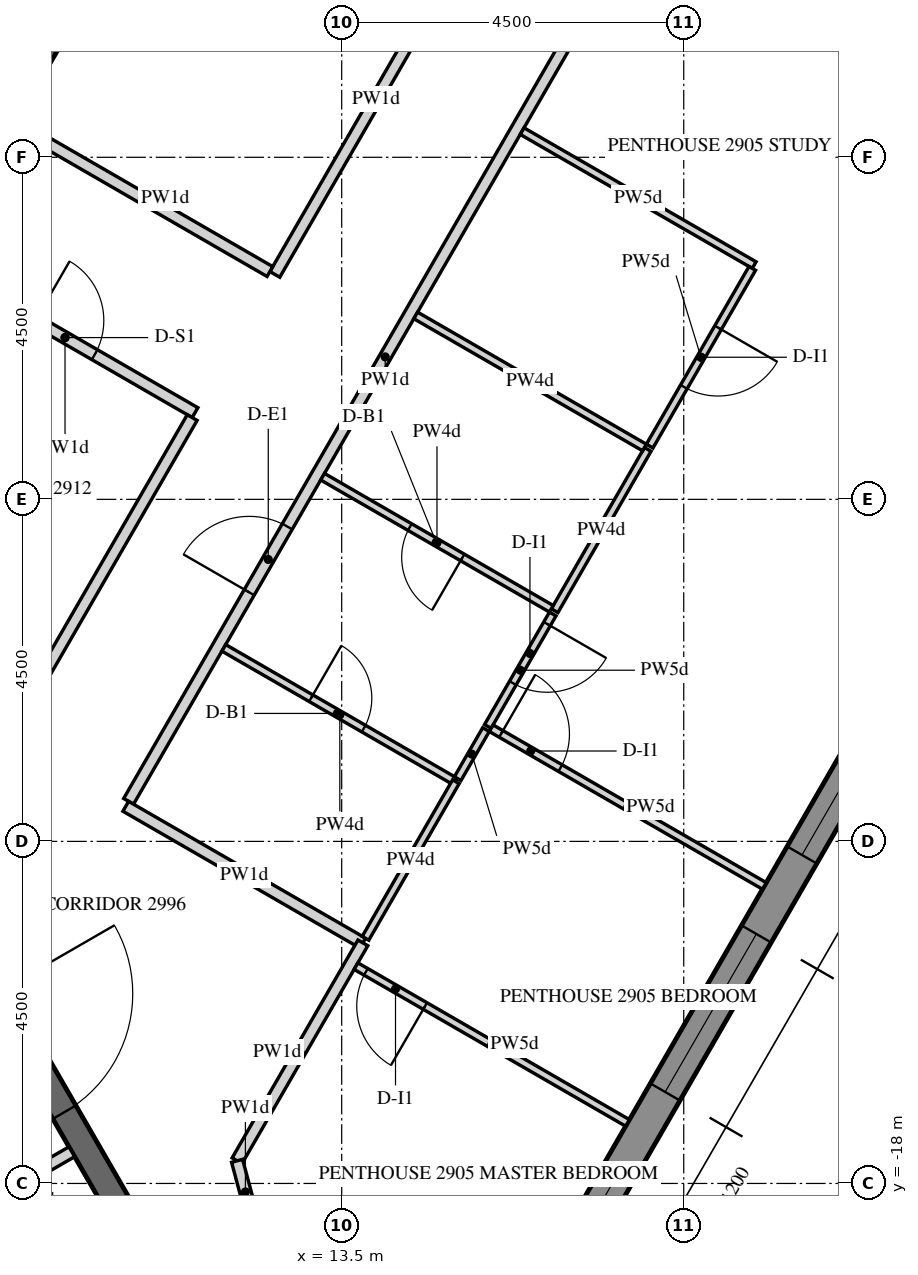
"""IFC4 building model, lengths in metres.
Left out: names, types, materials, properties, quantities, classifications, styles, units other than length and angle.
Written with IfcOpenShell. Run it as: python <this file> out.ifc"""

import sys

from ifc_helpers import new_model, si_unit, direction, frame, frame_2d, origin, place, context, subcontext, project, spatial, polyline, rectangle, outline, extrude, element, fill, save


model = new_model("IFC4")
c1 = context("Model", 3, precision=1e-05, world=origin(), true_north=direction((0.0, 1.0)))
c2 = subcontext(c1, "Body", "Model", "MODEL_VIEW")
j1 = project(units=[si_unit("LENGTHUNIT", "METRE"), si_unit("PLANEANGLEUNIT", "RADIAN")], contexts=[c1])
p1 = place(None, origin())
s1 = spatial("IfcSite", under=j1, at=p1, CompositionType="ELEMENT")
p2 = place(p1, origin())
s2 = spatial("IfcBuilding", under=s1, at=p2, CompositionType="ELEMENT")
p3 = place(p2, frame((0.0, 0.0, 372.9)))
s3 = spatial("IfcBuildingStorey", under=s2, at=p3, CompositionType="ELEMENT", Elevation=372.9)
p4 = place(p3, frame((15.273, -21.097, -0.15), z_axis=(0.0, 0.0, 1.0), x_axis=(0.499997453958, 0.866026873738, 0.0)))
e1 = element("IfcWall", 1, at=p4, inside=s3, PredefinedType="SOLIDWALL", context=c2, shape_type="SweptSolid", body=[
    extrude(outline(polyline([(-0.018, -0.225), (23.152, -0.225), (23.11, 0.225), (0.018, 0.225), (-0.018, -0.225)])), origin(), (0.0, 0.0, 1.0), 3.55),
])
p5 = place(p4, frame((1.366, 0.0, 0.45)))
e2 = element("IfcOpeningElement", 2, at=p5, cuts=e1, PredefinedType="OPENING", context=c2, shape_type="SweptSolid", body=[
    extrude(rectangle(XDim=2.4, YDim=3.0, at=frame_2d((1.2, 1.5))), frame((0.0, 0.235, 0.0), z_axis=(0.0, -1.0, 0.0), x_axis=(1.0, 0.0, 0.0)), (0.0, 0.0, 1.0), 0.47),
])
p6 = place(p4, frame((4.966, 0.0, 0.45)))
e3 = element("IfcOpeningElement", 3, at=p6, cuts=e1, PredefinedType="OPENING", context=c2, shape_type="SweptSolid", body=[
    extrude(rectangle(XDim=2.4, YDim=3.0, at=frame_2d((1.2, 1.5))), frame((0.0, 0.235, 0.0), z_axis=(0.0, -1.0, 0.0), x_axis=(1.0, 0.0, 0.0)), (0.0, 0.0, 1.0), 0.47),
])
p7 = place(p4, frame((8.566, 0.0, 0.45)))
e4 = element("IfcOpeningElement", 4, at=p7, cuts=e1, PredefinedType="OPENING", context=c2, shape_type="SweptSolid", body=[
    extrude(rectangle(XDim=2.4, YDim=3.0, at=frame_2d((1.2, 1.5))), frame((0.0, 0.235, 0.0), z_axis=(0.0, -1.0, 0.0), x_axis=(1.0, 0.0, 0.0)), (0.0, 0.0, 1.0), 0.47),
])
p8 = place(p4, frame((12.166, 0.0, 0.45)))
e5 = element("IfcOpeningElement", 5, at=p8, cuts=e1, PredefinedType="OPENING", context=c2, shape_type="SweptSolid", body=[
    extrude(rectangle(XDim=2.4, YDim=3.0, at=frame_2d((1.2, 1.5))), frame((0.0, 0.235, 0.0), z_axis=(0.0, -1.0, 0.0), x_axis=(1.0, 0.0, 0.0)), (0.0, 0.0, 1.0), 0.47),
])
p9 = place(p4, frame((15.766, 0.0, 0.45)))
e6 = element("IfcOpeningElement", 6, at=p9, cuts=e1, PredefinedType="OPENING", context=c2, shape_type="SweptSolid", body=[
    extrude(rectangle(XDim=2.4, YDim=3.0, at=frame_2d((1.2, 1.5))), frame((0.0, 0.235, 0.0), z_axis=(0.0, -1.0, 0.0), x_axis=(1.0, 0.0, 0.0)), (0.0, 0.0, 1.0), 0.47),
])
p10 = place(p4, frame((19.366, 0.0, 0.45)))
e7 = element("IfcOpeningElement", 7, at=p10, cuts=e1, PredefinedType="OPENING", context=c2, shape_type="SweptSolid", body=[
    extrude(rectangle(XDim=2.4, YDim=3.0, at=frame_2d((1.2, 1.5))), frame((0.0, 0.235, 0.0), z_axis=(0.0, -1.0, 0.0), x_axis=(1.0, 0.0, 0.0)), (0.0, 0.0, 1.0), 0.47),
])
p11 = place(p3, frame((5.673, -9.825, -0.15), z_axis=(0.0, 0.0, 1.0), x_axis=(0.499995046907, 0.866028263435, 0.0)))
e8 = element("IfcWall", 8, at=p11, inside=s3, PredefinedType="SHEAR", context=c2, shape_type="SweptSolid", body=[
    extrude(outline(polyline([(-0.101, -0.175), (11.446, -0.175), (11.244, 0.175), (0.101, 0.175), (-0.101, -0.175)])), origin(), (0.0, 0.0, 1.0), 3.55),
])
p12 = place(p11, frame((4.801, 0.0, 0.15)))
e9 = element("IfcOpeningElement", 9, at=p12, cuts=e8, PredefinedType="OPENING", context=c2, shape_type="SweptSolid", body=[
    extrude(rectangle(XDim=1.8, YDim=2.4, at=frame_2d((0.9, 1.2))), frame((0.0, 0.185, 0.0), z_axis=(0.0, -1.0, 0.0), x_axis=(1.0, 0.0, 0.0)), (0.0, 0.0, 1.0), 0.37),
])
p13 = place(p3, frame((5.773, -10.0, -0.15), z_axis=(0.0, 0.0, 1.0), x_axis=(0.500007911273, -0.866020836161, 0.0)))
e10 = element("IfcWall", 10, at=p13, inside=s3, PredefinedType="SHEAR", context=c2, shape_type="SweptSolid", body=[
    extrude(rectangle(XDim=14.51, YDim=0.35, at=frame_2d((7.255, 0.0))), origin(), (0.0, 0.0, 1.0), 3.55),
])
p14 = place(p13, frame((6.355, 0.0, 0.15)))
e11 = element("IfcOpeningElement", 11, at=p14, cuts=e10, PredefinedType="OPENING", context=c2, shape_type="SweptSolid", body=[
    extrude(rectangle(XDim=1.8, YDim=2.4, at=frame_2d((0.9, 1.2))), frame((0.0, 0.185, 0.0), z_axis=(0.0, -1.0, 0.0), x_axis=(1.0, 0.0, 0.0)), (0.0, 0.0, 1.0), 0.37),
])
p15 = place(p3, frame((8.456, -18.446, 0.0), z_axis=(0.0, 0.0, 1.0), x_axis=(0.866013532718, 0.500020560727, 0.0)))
e12 = element("IfcWall", 12, at=p15, inside=s3, PredefinedType="PARTITIONING", context=c2, shape_type="SweptSolid", body=[
    extrude(rectangle(XDim=1.725, YDim=0.15, at=frame_2d((0.863, 0.0))), origin(), (0.0, 0.0, 1.0), 2.47),
])
p16 = place(p3, frame((10.697, -12.973, 0.0), z_axis=(0.0, 0.0, 1.0), x_axis=(0.499991115059, 0.866030533446, 0.0)))
e13 = element("IfcWall", 13, at=p16, inside=s3, PredefinedType="PARTITIONING", context=c2, shape_type="SweptSolid", body=[
    extrude(rectangle(XDim=13.504, YDim=0.15, at=frame_2d((6.752, 0.0))), origin(), (0.0, 0.0, 1.0), 2.47),
])
p17 = place(p16, frame((3.175, 0.0, 0.0)))
e14 = element("IfcOpeningElement", 14, at=p17, cuts=e13, PredefinedType="OPENING", context=c2, shape_type="SweptSolid", body=[
    extrude(rectangle(XDim=1.0, YDim=2.1, at=frame_2d((0.5, 1.05))), frame((0.0, 0.085, 0.0), z_axis=(0.0, -1.0, 0.0), x_axis=(1.0, 0.0, 0.0)), (0.0, 0.0, 1.0), 0.17),
])
p18 = place(p3, frame((13.777, -14.838, 0.0), z_axis=(0.0, 0.0, 1.0), x_axis=(-0.866047807691, 0.499961193289, 0.0)))
e15 = element("IfcWall", 15, at=p18, inside=s3, PredefinedType="PARTITIONING", context=c2, shape_type="SweptSolid", body=[
    extrude(rectangle(XDim=3.6, YDim=0.15, at=frame_2d((1.8, 0.0))), origin(), (0.0, 0.0, 1.0), 2.47),
])
p19 = place(p3, frame((12.124, -17.701, 0.0), z_axis=(0.0, 0.0, 1.0), x_axis=(0.500018282537, 0.866014848099, 0.0)))
e16 = element("IfcWall", 16, at=p19, inside=s3, PredefinedType="PARTITIONING", context=c2, shape_type="SweptSolid", body=[
    extrude(rectangle(XDim=3.31, YDim=0.15, at=frame_2d((1.655, 0.0))), origin(), (0.0, 0.0, 1.0), 2.47),
])
p20 = place(p3, frame((12.343, -18.521, 0.0), z_axis=(0.0, 0.0, 1.0), x_axis=(-0.258846545656, 0.965918457118, 0.0)))
e17 = element("IfcWall", 17, at=p20, inside=s3, PredefinedType="PARTITIONING", context=c2, shape_type="SweptSolid", body=[
    extrude(rectangle(XDim=0.847, YDim=0.15, at=frame_2d((0.423, 0.0))), origin(), (0.0, 0.0, 1.0), 2.47),
])
p21 = place(p3, frame((15.285, -1.425, 0.0), z_axis=(0.0, 0.0, 1.0), x_axis=(-0.499972278664, -0.866041408113, 0.0)))
e18 = element("IfcWall", 18, at=p21, inside=s3, PredefinedType="PARTITIONING", context=c2, shape_type="SweptSolid", body=[
    extrude(rectangle(XDim=5.329, YDim=0.15, at=frame_2d((2.665, 0.0))), origin(), (0.0, 0.0, 1.0), 2.47),
])
p22 = place(p3, frame((12.555, -6.003, 0.0), z_axis=(0.0, 0.0, 1.0), x_axis=(-0.866016658288, 0.500015147339, 0.0)))
e19 = element("IfcWall", 19, at=p22, inside=s3, PredefinedType="PARTITIONING", context=c2, shape_type="SweptSolid", body=[
    extrude(rectangle(XDim=3.875, YDim=0.15, at=frame_2d((1.938, 0.0))), origin(), (0.0, 0.0, 1.0), 2.47),
])
p23 = place(p3, frame((8.15, -5.884, 0.0), z_axis=(0.0, 0.0, 1.0), x_axis=(0.866020906874, -0.500007788796, 0.0)))
e20 = element("IfcWall", 20, at=p23, inside=s3, PredefinedType="PARTITIONING", context=c2, shape_type="SweptSolid", body=[
    extrude(rectangle(XDim=3.95, YDim=0.15, at=frame_2d((1.975, 0.0))), origin(), (0.0, 0.0, 1.0), 2.47),
])
p24 = place(p23, frame((1.525, 0.0, 0.0)))
e21 = element("IfcOpeningElement", 21, at=p24, cuts=e20, PredefinedType="OPENING", context=c2, shape_type="SweptSolid", body=[
    extrude(rectangle(XDim=0.9, YDim=2.1, at=frame_2d((0.45, 1.05))), frame((0.0, 0.085, 0.0), z_axis=(0.0, -1.0, 0.0), x_axis=(1.0, 0.0, 0.0)), (0.0, 0.0, 1.0), 0.17),
])
p25 = place(p3, frame((11.533, -7.924, 0.0), z_axis=(0.0, 0.0, 1.0), x_axis=(-0.500001804394, -0.866024362014, 0.0)))
e22 = element("IfcWall", 22, at=p25, inside=s3, PredefinedType="PARTITIONING", context=c2, shape_type="SweptSolid", body=[
    extrude(rectangle(XDim=3.909, YDim=0.15, at=frame_2d((1.954, 0.0))), origin(), (0.0, 0.0, 1.0), 2.47),
])
p26 = place(p3, frame((16.277, -10.508, 0.0), z_axis=(0.0, 0.0, 1.0), x_axis=(-0.500027584368, -0.866009477356, 0.0)))
e23 = element("IfcWall", 23, at=p26, inside=s3, PredefinedType="PARTITIONING", context=c2, shape_type="SweptSolid", body=[
    extrude(rectangle(XDim=1.708, YDim=0.1, at=frame_2d((0.854, 0.0))), origin(), (0.0, 0.0, 1.0), 2.47),
])
p27 = place(p26, frame((0.15, 0.0, 0.0)))
e24 = element("IfcOpeningElement", 24, at=p27, cuts=e23, PredefinedType="OPENING", context=c2, shape_type="SweptSolid", body=[
    extrude(rectangle(XDim=0.9, YDim=2.1, at=frame_2d((0.45, 1.05))), frame((0.0, 0.06, 0.0), z_axis=(0.0, -1.0, 0.0), x_axis=(1.0, 0.0, 0.0)), (0.0, 0.0, 1.0), 0.12),
])
p28 = place(p3, frame((15.467, -12.011, 0.0), z_axis=(0.0, 0.0, 1.0), x_axis=(0.86602981871, -0.499992353047, 0.0)))
e25 = element("IfcWall", 25, at=p28, inside=s3, PredefinedType="PARTITIONING", context=c2, shape_type="SweptSolid", body=[
    extrude(rectangle(XDim=4.15, YDim=0.1, at=frame_2d((2.075, 0.0))), origin(), (0.0, 0.0, 1.0), 2.47),
])
p29 = place(p28, frame((0.15, 0.0, 0.0)))
e26 = element("IfcOpeningElement", 26, at=p29, cuts=e25, PredefinedType="OPENING", context=c2, shape_type="SweptSolid", body=[
    extrude(rectangle(XDim=0.9, YDim=2.1, at=frame_2d((0.45, 1.05))), frame((0.0, 0.06, 0.0), z_axis=(0.0, -1.0, 0.0), x_axis=(1.0, 0.0, 0.0)), (0.0, 0.0, 1.0), 0.12),
])
p30 = place(p3, frame((17.527, -8.343, 0.0), z_axis=(0.0, 0.0, 1.0), x_axis=(-0.500018594424, -0.866014668023, 0.0)))
e27 = element("IfcWall", 27, at=p30, inside=s3, PredefinedType="PARTITIONING", context=c2, shape_type="SweptSolid", body=[
    extrude(rectangle(XDim=2.45, YDim=0.1, at=frame_2d((1.225, 0.0))), origin(), (0.0, 0.0, 1.0), 2.47),
])
p31 = place(p3, frame((15.874, -4.156, 0.0), z_axis=(0.0, 0.0, 1.0), x_axis=(0.866031034943, -0.499990246421, 0.0)))
e28 = element("IfcWall", 28, at=p31, inside=s3, PredefinedType="PARTITIONING", context=c2, shape_type="SweptSolid", body=[
    extrude(rectangle(XDim=3.525, YDim=0.1, at=frame_2d((1.762, 0.0))), origin(), (0.0, 0.0, 1.0), 2.47),
])
p32 = place(p3, frame((18.902, -5.961, 0.0), z_axis=(0.0, 0.0, 1.0), x_axis=(-0.50000943426, -0.866019956843, 0.0)))
e29 = element("IfcWall", 29, at=p32, inside=s3, PredefinedType="PARTITIONING", context=c2, shape_type="SweptSolid", body=[
    extrude(rectangle(XDim=2.7, YDim=0.1, at=frame_2d((1.35, 0.0))), origin(), (0.0, 0.0, 1.0), 2.47),
])
p33 = place(p32, frame((0.9, 0.0, 0.0)))
e30 = element("IfcOpeningElement", 30, at=p33, cuts=e29, PredefinedType="OPENING", context=c2, shape_type="SweptSolid", body=[
    extrude(rectangle(XDim=0.9, YDim=2.1, at=frame_2d((0.45, 1.05))), frame((0.0, 0.06, 0.0), z_axis=(0.0, -1.0, 0.0), x_axis=(1.0, 0.0, 0.0)), (0.0, 0.0, 1.0), 0.12),
])
p34 = place(p3, frame((11.949, -10.954, 0.0), z_axis=(0.0, 0.0, 1.0), x_axis=(0.866001044215, -0.500042189638, 0.0)))
e31 = element("IfcWall", 31, at=p34, inside=s3, PredefinedType="PARTITIONING", context=c2, shape_type="SweptSolid", body=[
    extrude(rectangle(XDim=3.525, YDim=0.1, at=frame_2d((1.763, 0.0))), origin(), (0.0, 0.0, 1.0), 2.47),
])
p35 = place(p34, frame((1.325, 0.0, 0.0)))
e32 = element("IfcOpeningElement", 32, at=p35, cuts=e31, PredefinedType="OPENING", context=c2, shape_type="SweptSolid", body=[
    extrude(rectangle(XDim=0.8, YDim=2.1, at=frame_2d((0.4, 1.05))), frame((0.0, 0.06, 0.0), z_axis=(0.0, -1.0, 0.0), x_axis=(1.0, 0.0, 0.0)), (0.0, 0.0, 1.0), 0.12),
])
p36 = place(p3, frame((15.026, -12.675, 0.0), z_axis=(0.0, 0.0, 1.0), x_axis=(0.500119347963, 0.86595648724, 0.0)))
e33 = element("IfcWall", 33, at=p36, inside=s3, PredefinedType="PARTITIONING", context=c2, shape_type="SweptSolid", body=[
    extrude(rectangle(XDim=0.745, YDim=0.1, at=frame_2d((0.373, 0.0))), origin(), (0.0, 0.0, 1.0), 2.47),
])
p37 = place(p3, frame((16.258, -10.44, 0.0), z_axis=(0.0, 0.0, 1.0), x_axis=(-0.866055725969, 0.499947476758, 0.0)))
e34 = element("IfcWall", 34, at=p37, inside=s3, PredefinedType="PARTITIONING", context=c2, shape_type="SweptSolid", body=[
    extrude(rectangle(XDim=3.475, YDim=0.1, at=frame_2d((1.737, 0.0))), origin(), (0.0, 0.0, 1.0), 2.47),
])
p38 = place(p37, frame((1.35, 0.0, 0.0)))
e35 = element("IfcOpeningElement", 35, at=p38, cuts=e34, PredefinedType="OPENING", context=c2, shape_type="SweptSolid", body=[
    extrude(rectangle(XDim=0.8, YDim=2.1, at=frame_2d((0.4, 1.05))), frame((0.0, 0.06, 0.0), z_axis=(0.0, -1.0, 0.0), x_axis=(1.0, 0.0, 0.0)), (0.0, 0.0, 1.0), 0.12),
])
p39 = place(p3, frame((13.813, -14.775, 0.0), z_axis=(0.0, 0.0, 1.0), x_axis=(0.500101476366, 0.86596680845, 0.0)))
e36 = element("IfcWall", 36, at=p39, inside=s3, PredefinedType="PARTITIONING", context=c2, shape_type="SweptSolid", body=[
    extrude(rectangle(XDim=2.379, YDim=0.1, at=frame_2d((1.189, 0.0))), origin(), (0.0, 0.0, 1.0), 2.47),
])
p40 = place(p3, frame((17.261, -17.204, 0.0), z_axis=(0.0, 0.0, 1.0), x_axis=(-0.866034795751, 0.499983732284, 0.0)))
e37 = element("IfcWall", 37, at=p40, inside=s3, PredefinedType="PARTITIONING", context=c2, shape_type="SweptSolid", body=[
    extrude(rectangle(XDim=4.125, YDim=0.1, at=frame_2d((2.062, 0.0))), origin(), (0.0, 0.0, 1.0), 2.47),
])
p41 = place(p40, frame((3.075, 0.0, 0.0)))
e38 = element("IfcOpeningElement", 38, at=p41, cuts=e37, PredefinedType="OPENING", context=c2, shape_type="SweptSolid", body=[
    extrude(rectangle(XDim=0.9, YDim=2.1, at=frame_2d((0.45, 1.05))), frame((0.0, 0.06, 0.0), z_axis=(0.0, -1.0, 0.0), x_axis=(1.0, 0.0, 0.0)), (0.0, 0.0, 1.0), 0.12),
])
p42 = place(p3, frame((17.483, -8.318, 0.0), z_axis=(0.0, 0.0, 1.0), x_axis=(-0.866025305473, 0.500000170281, 0.0)))
e39 = element("IfcWall", 39, at=p42, inside=s3, PredefinedType="PARTITIONING", context=c2, shape_type="SweptSolid", body=[
    extrude(rectangle(XDim=3.475, YDim=0.1, at=frame_2d((1.738, 0.0))), origin(), (0.0, 0.0, 1.0), 2.47),
])
p43 = place(p5, frame((0.0, 0.155, 0.0)))
e40 = element("IfcWindow", 40, at=p43, inside=s3, PartitioningType="DOUBLE_PANEL_VERTICAL", PredefinedType="WINDOW", context=c2, shape_type="SweptSolid", body=[
    extrude(rectangle(XDim=2.4, YDim=3.0, at=frame_2d((1.2, 1.5))), frame((0.0, 0.03, 0.0), z_axis=(0.0, -1.0, 0.0), x_axis=(1.0, 0.0, 0.0)), (0.0, 0.0, 1.0), 0.06),
])
fill(e2, e40)
p44 = place(p6, frame((0.0, 0.155, 0.0)))
e41 = element("IfcWindow", 41, at=p44, inside=s3, PartitioningType="DOUBLE_PANEL_VERTICAL", PredefinedType="WINDOW", context=c2, shape_type="SweptSolid", body=[
    extrude(rectangle(XDim=2.4, YDim=3.0, at=frame_2d((1.2, 1.5))), frame((0.0, 0.03, 0.0), z_axis=(0.0, -1.0, 0.0), x_axis=(1.0, 0.0, 0.0)), (0.0, 0.0, 1.0), 0.06),
])
fill(e3, e41)
p45 = place(p7, frame((0.0, 0.155, 0.0)))
e42 = element("IfcWindow", 42, at=p45, inside=s3, PartitioningType="DOUBLE_PANEL_VERTICAL", PredefinedType="WINDOW", context=c2, shape_type="SweptSolid", body=[
    extrude(rectangle(XDim=2.4, YDim=3.0, at=frame_2d((1.2, 1.5))), frame((0.0, 0.03, 0.0), z_axis=(0.0, -1.0, 0.0), x_axis=(1.0, 0.0, 0.0)), (0.0, 0.0, 1.0), 0.06),
])
fill(e4, e42)
p46 = place(p14, origin())
e43 = element("IfcDoor", 43, at=p46, inside=s3, OperationType="DOUBLE_DOOR_SINGLE_SWING", PredefinedType="DOOR", context=c2, shape_type="SweptSolid", body=[
    extrude(rectangle(XDim=1.8, YDim=2.4, at=frame_2d((0.9, 1.2))), frame((0.0, 0.025, 0.0), z_axis=(0.0, -1.0, 0.0), x_axis=(1.0, 0.0, 0.0)), (0.0, 0.0, 1.0), 0.05),
])
fill(e11, e43)
p47 = place(p17, origin())
e44 = element("IfcDoor", 44, at=p47, inside=s3, OperationType="SINGLE_SWING_LEFT", PredefinedType="DOOR", context=c2, shape_type="SweptSolid", body=[
    extrude(rectangle(XDim=1.0, YDim=2.1, at=frame_2d((0.5, 1.05))), frame((0.0, 0.025, 0.0), z_axis=(0.0, -1.0, 0.0), x_axis=(1.0, 0.0, 0.0)), (0.0, 0.0, 1.0), 0.05),
])
fill(e14, e44)
p48 = place(p35, origin())
e45 = element("IfcDoor", 45, at=p48, inside=s3, OperationType="SINGLE_SWING_RIGHT", PredefinedType="DOOR", context=c2, shape_type="SweptSolid", body=[
    extrude(rectangle(XDim=0.8, YDim=2.1, at=frame_2d((0.4, 1.05))), frame((0.0, 0.025, 0.0), z_axis=(0.0, -1.0, 0.0), x_axis=(1.0, 0.0, 0.0)), (0.0, 0.0, 1.0), 0.05),
])
fill(e32, e45)
p49 = place(p27, origin())
e46 = element("IfcDoor", 46, at=p49, inside=s3, OperationType="SINGLE_SWING_RIGHT", PredefinedType="DOOR", context=c2, shape_type="SweptSolid", body=[
    extrude(rectangle(XDim=0.9, YDim=2.1, at=frame_2d((0.45, 1.05))), frame((0.0, 0.025, 0.0), z_axis=(0.0, -1.0, 0.0), x_axis=(1.0, 0.0, 0.0)), (0.0, 0.0, 1.0), 0.05),
])
fill(e24, e46)
p50 = place(p41, origin())
e47 = element("IfcDoor", 47, at=p50, inside=s3, OperationType="SINGLE_SWING_RIGHT", PredefinedType="DOOR", context=c2, shape_type="SweptSolid", body=[
    extrude(rectangle(XDim=0.9, YDim=2.1, at=frame_2d((0.45, 1.05))), frame((0.0, 0.025, 0.0), z_axis=(0.0, -1.0, 0.0), x_axis=(1.0, 0.0, 0.0)), (0.0, 0.0, 1.0), 0.05),
])
fill(e38, e47)
p51 = place(p29, origin())
e48 = element("IfcDoor", 48, at=p51, inside=s3, OperationType="SINGLE_SWING_RIGHT", PredefinedType="DOOR", context=c2, shape_type="SweptSolid", body=[
    extrude(rectangle(XDim=0.9, YDim=2.1, at=frame_2d((0.45, 1.05))), frame((0.0, 0.025, 0.0), z_axis=(0.0, -1.0, 0.0), x_axis=(1.0, 0.0, 0.0)), (0.0, 0.0, 1.0), 0.05),
])
fill(e26, e48)
p52 = place(p38, origin())
e49 = element("IfcDoor", 49, at=p52, inside=s3, OperationType="SINGLE_SWING_LEFT", PredefinedType="DOOR", context=c2, shape_type="SweptSolid", body=[
    extrude(rectangle(XDim=0.8, YDim=2.1, at=frame_2d((0.4, 1.05))), frame((0.0, 0.025, 0.0), z_axis=(0.0, -1.0, 0.0), x_axis=(1.0, 0.0, 0.0)), (0.0, 0.0, 1.0), 0.05),
])
fill(e35, e49)
p53 = place(p33, origin())
e50 = element("IfcDoor", 50, at=p53, inside=s3, OperationType="SINGLE_SWING_RIGHT", PredefinedType="DOOR", context=c2, shape_type="SweptSolid", body=[
    extrude(rectangle(XDim=0.9, YDim=2.1, at=frame_2d((0.45, 1.05))), frame((0.0, 0.025, 0.0), z_axis=(0.0, -1.0, 0.0), x_axis=(1.0, 0.0, 0.0)), (0.0, 0.0, 1.0), 0.05),
])
fill(e30, e50)
p54 = place(p24, origin())
e51 = element("IfcDoor", 51, at=p54, inside=s3, OperationType="SINGLE_SWING_LEFT", PredefinedType="DOOR", context=c2, shape_type="SweptSolid", body=[
    extrude(rectangle(XDim=0.9, YDim=2.1, at=frame_2d((0.45, 1.05))), frame((0.0, 0.025, 0.0), z_axis=(0.0, -1.0, 0.0), x_axis=(1.0, 0.0, 0.0)), (0.0, 0.0, 1.0), 0.05),
])
fill(e21, e51)
save(model, sys.argv[1])
